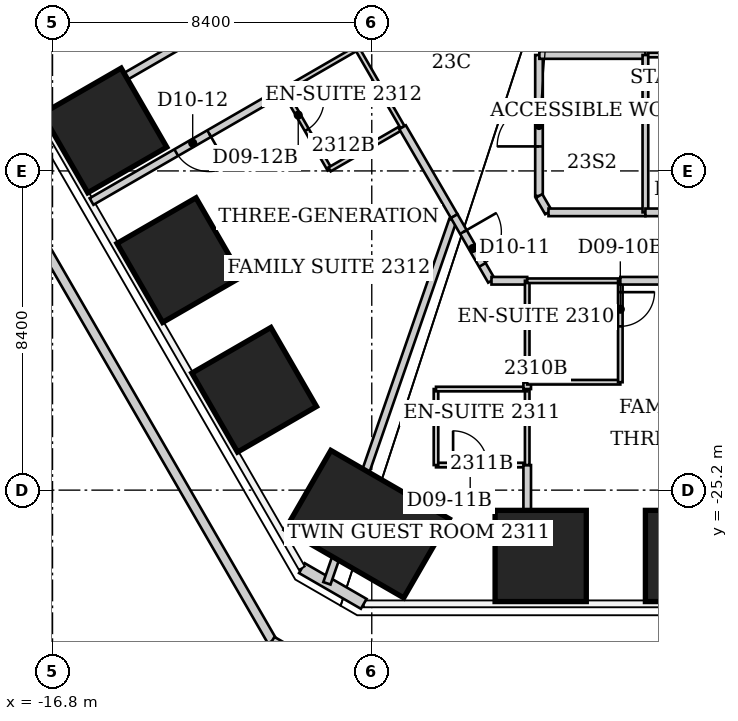
"""IFC4 building model, lengths in metres.
Left out: names, types, materials, properties, quantities, classifications, styles, units other than length and angle.
Written with IfcOpenShell. Run it as: python <this file> out.ifc"""

import sys

from ifc_helpers import new_model, si_unit, direction, frame, frame_2d, origin, origin_2d, place, context, subcontext, project, spatial, rectangle, extrude, clip, halfspace, element, fill, save


model = new_model("IFC4")
c1 = context("Model", 3, precision=1e-05, world=origin(), true_north=direction((0.0, 1.0)))
c2 = subcontext(c1, "Body", "Model", "MODEL_VIEW")
j1 = project(units=[si_unit("LENGTHUNIT", "METRE"), si_unit("PLANEANGLEUNIT", "RADIAN")], contexts=[c1])
p1 = place(None, origin())
s1 = spatial("IfcSite", under=j1, at=p1, CompositionType="ELEMENT")
p2 = place(p1, origin())
s2 = spatial("IfcBuilding", under=s1, at=p2, CompositionType="ELEMENT")
p3 = place(p2, frame((0.0, 0.0, 96.8)))
s3 = spatial("IfcBuildingStorey", under=s2, at=p3, CompositionType="ELEMENT", Elevation=96.8)
p4 = place(p3, frame((0.0, -26.932, -0.055), z_axis=(0.0, 0.0, 1.0), x_axis=(0.0, -1.0, 0.0)))
e1 = element("IfcColumn", 1, at=p4, inside=s3, PredefinedType="COLUMN", context=c2, shape_type="SweptSolid", body=[
    clip(extrude(rectangle(XDim=2.4, YDim=2.4, at=origin_2d()), origin(), (0.0, 0.0, 1.0), 3.855), halfspace(frame((0.0, 0.0, 0.055)), True)),
])
p5 = place(p3, frame((-3.955, -26.932, -0.063), z_axis=(0.0, 0.0, 1.0), x_axis=(0.0, -1.0, 0.0)))
e2 = element("IfcColumn", 2, at=p5, inside=s3, PredefinedType="COLUMN", context=c2, shape_type="SweptSolid", body=[
    clip(extrude(rectangle(XDim=2.4, YDim=2.4, at=origin_2d()), origin(), (0.0, 0.0, 1.0), 3.863), halfspace(frame((0.0, 0.0, 0.063)), True)),
])
p6 = place(p3, frame((-8.518, -26.094, -0.074), z_axis=(0.0, 0.0, 1.0), x_axis=(-0.5, -0.866025403784, 0.0)))
e3 = element("IfcColumn", 3, at=p6, inside=s3, PredefinedType="COLUMN", context=c2, shape_type="SweptSolid", body=[
    clip(extrude(rectangle(XDim=2.4, YDim=3.6, at=origin_2d()), origin(), (0.0, 0.0, 1.0), 3.874), halfspace(frame((0.0, 0.0, 0.074)), True)),
])
p7 = place(p3, frame((-11.494, -22.559, -0.073), z_axis=(0.0, 0.0, 1.0), x_axis=(-0.866025403784, -0.5, 0.0)))
e4 = element("IfcColumn", 4, at=p7, inside=s3, PredefinedType="COLUMN", context=c2, shape_type="SweptSolid", body=[
    clip(extrude(rectangle(XDim=2.4, YDim=2.4, at=origin_2d()), origin(), (0.0, 0.0, 1.0), 3.873), halfspace(frame((0.0, 0.0, 0.073)), True)),
])
p8 = place(p3, frame((-13.464, -19.147, -0.064), z_axis=(0.0, 0.0, 1.0), x_axis=(-0.866025403784, -0.5, 0.0)))
e5 = element("IfcColumn", 5, at=p8, inside=s3, PredefinedType="COLUMN", context=c2, shape_type="SweptSolid", body=[
    clip(extrude(rectangle(XDim=2.4, YDim=2.4, at=origin_2d()), origin(), (0.0, 0.0, 1.0), 3.865), halfspace(frame((0.0, 0.0, 0.064)), True)),
])
p9 = place(p3, frame((-15.434, -15.735, -0.056), z_axis=(0.0, 0.0, 1.0), x_axis=(-0.866025403784, -0.5, 0.0)))
e6 = element("IfcColumn", 6, at=p9, inside=s3, PredefinedType="COLUMN", context=c2, shape_type="SweptSolid", body=[
    clip(extrude(rectangle(XDim=2.4, YDim=2.4, at=origin_2d()), origin(), (0.0, 0.0, 1.0), 3.856), halfspace(frame((0.0, 0.0, 0.056)), True)),
])
p10 = place(p3, frame((-17.404, -12.323, -0.048), z_axis=(0.0, 0.0, 1.0), x_axis=(-0.866025403784, -0.5, 0.0)))
e7 = element("IfcColumn", 7, at=p10, inside=s3, PredefinedType="COLUMN", context=c2, shape_type="SweptSolid", body=[
    clip(extrude(rectangle(XDim=2.4, YDim=2.4, at=origin_2d()), origin(), (0.0, 0.0, 1.0), 3.848), halfspace(frame((0.0, 0.0, 0.048)), True)),
])
p11 = place(p3, frame((-8.611, -28.192, 0.0), z_axis=(0.0, 0.0, 1.0), x_axis=(-0.866045024864, 0.499966013754, 0.0)))
e8 = element("IfcWall", 8, at=p11, inside=s3, PredefinedType="SOLIDWALL", context=c2, shape_type="SweptSolid", body=[
    extrude(rectangle(XDim=1.88, YDim=0.3, at=frame_2d((0.94, 0.0))), origin(), (0.0, 0.0, 1.0), 3.64),
])
p12 = place(p3, frame((-30.775, 5.038, 0.0), z_axis=(0.0, 0.0, 1.0), x_axis=(0.499999235055, -0.866025845425, 0.0)))
e9 = element("IfcWall", 9, at=p12, inside=s3, PredefinedType="PARAPET", context=c2, shape_type="SweptSolid", body=[
    extrude(rectangle(XDim=39.5, YDim=0.25, at=frame_2d((19.75, 0.0))), origin(), (0.0, 0.0, 1.0), 1.1),
])
p13 = place(p3, frame((-11.024, -29.171, 0.0), z_axis=(0.0, 0.0, 1.0), x_axis=(0.865627711351, -0.500688191733, 0.0)))
e10 = element("IfcWall", 10, at=p13, inside=s3, PredefinedType="PARAPET", context=c2, shape_type="SweptSolid", body=[
    extrude(rectangle(XDim=1.991, YDim=0.25, at=frame_2d((0.996, 0.0))), origin(), (0.0, 0.0, 1.0), 1.1),
])
p14 = place(p3, frame((-15.774, -17.605, 0.0), z_axis=(0.0, 0.0, 1.0), x_axis=(0.865924141063, 0.500175351175, 0.0)))
e11 = element("IfcWall", 11, at=p14, inside=s3, PredefinedType="PARTITIONING", context=c2, shape_type="SweptSolid", body=[
    extrude(rectangle(XDim=5.848, YDim=0.2, at=frame_2d((2.924, 0.0))), origin(), (0.0, 0.0, 1.0), 3.64),
])
p15 = place(p14, frame((2.574, 0.0, 0.0)))
e12 = element("IfcOpeningElement", 12, at=p15, cuts=e11, PredefinedType="OPENING", context=c2, shape_type="SweptSolid", body=[
    extrude(rectangle(XDim=1.0, YDim=2.13, at=frame_2d((0.5, 1.065))), frame((0.0, 0.1, 0.0), z_axis=(0.0, -1.0, 0.0), x_axis=(1.0, 0.0, 0.0)), (0.0, 0.0, 1.0), 0.2),
])
p16 = place(p3, frame((-10.71, -14.68, 0.0), z_axis=(0.0, 0.0, 1.0), x_axis=(0.499693115345, -0.866202511239, 0.0)))
e13 = element("IfcWall", 13, at=p16, inside=s3, PredefinedType="PARTITIONING", context=c2, shape_type="SweptSolid", body=[
    extrude(rectangle(XDim=2.401, YDim=0.12, at=frame_2d((1.201, 0.0))), origin(), (0.0, 0.0, 1.0), 3.64),
])
p17 = place(p16, frame((0.3, 0.0, 0.0)))
e14 = element("IfcOpeningElement", 14, at=p17, cuts=e13, PredefinedType="OPENING", context=c2, shape_type="SweptSolid", body=[
    extrude(rectangle(XDim=0.9, YDim=2.03, at=frame_2d((0.45, 1.015))), frame((0.0, 0.06, 0.0), z_axis=(0.0, -1.0, 0.0), x_axis=(1.0, 0.0, 0.0)), (0.0, 0.0, 1.0), 0.12),
])
p18 = place(p3, frame((-10.71, -14.68, 0.0), z_axis=(0.0, 0.0, 1.0), x_axis=(0.86575271903, 0.500472006703, 0.0)))
e15 = element("IfcWall", 15, at=p18, inside=s3, PredefinedType="PARTITIONING", context=c2, shape_type="SweptSolid", body=[
    extrude(rectangle(XDim=2.218, YDim=0.12, at=frame_2d((1.109, 0.0))), origin(), (0.0, 0.0, 1.0), 3.64),
])
p19 = place(p3, frame((-10.003, -11.498, 0.0), z_axis=(0.0, 0.0, 1.0), x_axis=(-0.865882003792, -0.500248293859, 0.0)))
e16 = element("IfcWall", 16, at=p19, inside=s3, PredefinedType="PARTITIONING", context=c2, shape_type="SweptSolid", body=[
    extrude(rectangle(XDim=8.051, YDim=0.2, at=frame_2d((4.025, 0.0))), origin(), (0.0, 0.0, 1.0), 3.64),
])
p20 = place(p3, frame((-9.58, -27.652, 0.0), z_axis=(0.0, 0.0, 1.0), x_axis=(0.327601243296, 0.944816080193, 0.0)))
e17 = element("IfcWall", 17, at=p20, inside=s3, PredefinedType="PARTITIONING", context=c2, shape_type="SweptSolid", body=[
    extrude(rectangle(XDim=10.116, YDim=0.2, at=frame_2d((5.058, 0.0))), origin(), (0.0, 0.0, 1.0), 3.64),
])
p21 = place(p3, frame((-9.51, -16.76, 0.0), z_axis=(0.0, 0.0, 1.0), x_axis=(0.865705017107, 0.500554515868, 0.0)))
e18 = element("IfcWall", 18, at=p21, inside=s3, PredefinedType="PARTITIONING", context=c2, shape_type="SweptSolid", body=[
    extrude(rectangle(XDim=2.218, YDim=0.12, at=frame_2d((1.109, 0.0))), origin(), (0.0, 0.0, 1.0), 3.64),
])
p22 = place(p3, frame((-8.79, -13.57, 0.0), z_axis=(0.0, 0.0, 1.0), x_axis=(0.499737123639, -0.866177122335, 0.0)))
e19 = element("IfcWall", 19, at=p22, inside=s3, PredefinedType="PARTITIONING", context=c2, shape_type="SweptSolid", body=[
    extrude(rectangle(XDim=2.401, YDim=0.12, at=frame_2d((1.201, 0.0))), origin(), (0.0, 0.0, 1.0), 3.64),
])
p23 = place(p3, frame((-7.59, -15.65, 0.0), z_axis=(0.0, 0.0, 1.0), x_axis=(0.502507574725, -0.864572806271, 0.0)))
e20 = element("IfcWall", 20, at=p23, inside=s3, PredefinedType="PARTITIONING", context=c2, shape_type="SweptSolid", body=[
    extrude(rectangle(XDim=2.707, YDim=0.2, at=frame_2d((1.353, 0.0))), origin(), (0.0, 0.0, 1.0), 3.64),
])
p24 = place(p3, frame((-6.71, -24.54, 0.0), z_axis=(0.0, 0.0, 1.0), x_axis=(1.0, 0.0, 0.0)))
e21 = element("IfcWall", 21, at=p24, inside=s3, PredefinedType="PARTITIONING", context=c2, shape_type="SweptSolid", body=[
    extrude(rectangle(XDim=2.4, YDim=0.12, at=frame_2d((1.2, 0.0))), origin(), (0.0, 0.0, 1.0), 3.64),
])
p25 = place(p24, frame((0.45, 0.0, 0.0)))
e22 = element("IfcOpeningElement", 22, at=p25, cuts=e21, PredefinedType="OPENING", context=c2, shape_type="SweptSolid", body=[
    extrude(rectangle(XDim=0.9, YDim=2.03, at=frame_2d((0.45, 1.015))), frame((0.0, 0.06, 0.0), z_axis=(0.0, -1.0, 0.0), x_axis=(1.0, 0.0, 0.0)), (0.0, 0.0, 1.0), 0.12),
])
p26 = place(p3, frame((-6.71, -22.54, 0.0), z_axis=(0.0, 0.0, 1.0), x_axis=(0.0, -1.0, 0.0)))
e23 = element("IfcWall", 23, at=p26, inside=s3, PredefinedType="PARTITIONING", context=c2, shape_type="SweptSolid", body=[
    extrude(rectangle(XDim=2.0, YDim=0.12, at=frame_2d((1.0, 0.0))), origin(), (0.0, 0.0, 1.0), 3.64),
])
p27 = place(p3, frame((-6.23, -17.99, 0.0), z_axis=(0.0, 0.0, 1.0), x_axis=(0.499431599995, -0.866353321068, 0.0)))
e24 = element("IfcWall", 24, at=p27, inside=s3, PredefinedType="PARTITIONING", context=c2, shape_type="SweptSolid", body=[
    extrude(rectangle(XDim=1.962, YDim=0.2, at=frame_2d((0.981, 0.0))), origin(), (0.0, 0.0, 1.0), 3.64),
])
p28 = place(p27, frame((0.481, 0.0, 0.0)))
e25 = element("IfcOpeningElement", 25, at=p28, cuts=e24, PredefinedType="OPENING", context=c2, shape_type="SweptSolid", body=[
    extrude(rectangle(XDim=1.0, YDim=2.13, at=frame_2d((0.5, 1.065))), frame((0.0, 0.1, 0.0), z_axis=(0.0, -1.0, 0.0), x_axis=(1.0, 0.0, 0.0)), (0.0, 0.0, 1.0), 0.2),
])
p29 = place(p3, frame((-5.25, -19.69, 0.0), z_axis=(0.0, 0.0, 1.0), x_axis=(1.0, 0.0, 0.0)))
e26 = element("IfcWall", 26, at=p29, inside=s3, PredefinedType="PARTITIONING", context=c2, shape_type="SweptSolid", body=[
    extrude(rectangle(XDim=0.94, YDim=0.2, at=frame_2d((0.47, 0.0))), origin(), (0.0, 0.0, 1.0), 3.64),
])
p30 = place(p3, frame((-4.31, -28.07, 0.0), z_axis=(0.0, 0.0, 1.0), x_axis=(0.0, 1.0, 0.0)))
e27 = element("IfcWall", 27, at=p30, inside=s3, PredefinedType="PARTITIONING", context=c2, shape_type="SweptSolid", body=[
    extrude(rectangle(XDim=3.53, YDim=0.2, at=frame_2d((1.765, 0.0))), origin(), (0.0, 0.0, 1.0), 3.64),
])
p31 = place(p3, frame((-4.31, -24.54, 0.0), z_axis=(0.0, 0.0, 1.0), x_axis=(0.0, 1.0, 0.0)))
e28 = element("IfcWall", 28, at=p31, inside=s3, PredefinedType="PARTITIONING", context=c2, shape_type="SweptSolid", body=[
    extrude(rectangle(XDim=2.0, YDim=0.12, at=frame_2d((1.0, 0.0))), origin(), (0.0, 0.0, 1.0), 3.64),
])
p32 = place(p3, frame((-4.31, -22.54, 0.0), z_axis=(0.0, 0.0, 1.0), x_axis=(-1.0, 0.0, 0.0)))
e29 = element("IfcWall", 29, at=p32, inside=s3, PredefinedType="PARTITIONING", context=c2, shape_type="SweptSolid", body=[
    extrude(rectangle(XDim=2.4, YDim=0.12, at=frame_2d((1.2, 0.0))), origin(), (0.0, 0.0, 1.0), 3.64),
])
p33 = place(p3, frame((-4.31, -22.54, 0.0), z_axis=(0.0, 0.0, 1.0), x_axis=(0.0, 1.0, 0.0)))
e30 = element("IfcWall", 30, at=p33, inside=s3, PredefinedType="PARTITIONING", context=c2, shape_type="SweptSolid", body=[
    extrude(rectangle(XDim=0.18, YDim=0.2, at=frame_2d((0.09, 0.0))), origin(), (0.0, 0.0, 1.0), 3.64),
])
p34 = place(p3, frame((-4.31, -22.36, 0.0), z_axis=(0.0, 0.0, 1.0), x_axis=(0.0, 1.0, 0.0)))
e31 = element("IfcWall", 31, at=p34, inside=s3, PredefinedType="PARTITIONING", context=c2, shape_type="SweptSolid", body=[
    extrude(rectangle(XDim=2.67, YDim=0.12, at=frame_2d((1.335, 0.0))), origin(), (0.0, 0.0, 1.0), 3.64),
])
for number, where, z_axis, x_axis in (
    (32, (-4.31, -22.36, 0.0), (0.0, 0.0, 1.0), (1.0, 0.0, 0.0)),
    (33, (-4.31, -19.69, 0.0), (0.0, 0.0, 1.0), (1.0, 0.0, 0.0)),
):
    element("IfcWall", number, at=place(p3, frame(where, z_axis=z_axis, x_axis=x_axis)), inside=s3, PredefinedType="PARTITIONING", context=c2, shape_type="SweptSolid", body=[
        extrude(rectangle(XDim=2.45, YDim=0.12, at=frame_2d((1.225, 0.0))), origin(), (0.0, 0.0, 1.0), 3.64),
    ])
p35 = place(p3, frame((-4.0, -17.46, 0.0), z_axis=(0.0, 0.0, 1.0), x_axis=(0.0, 1.0, 0.0)))
e34 = element("IfcWall", 34, at=p35, inside=s3, PredefinedType="PARTITIONING", context=c2, shape_type="SweptSolid", body=[
    extrude(rectangle(XDim=3.71, YDim=0.2, at=frame_2d((1.855, 0.0))), origin(), (0.0, 0.0, 1.0), 2.878),
])
p36 = place(p35, frame((1.305, 0.0, 0.0)))
e35 = element("IfcOpeningElement", 35, at=p36, cuts=e34, PredefinedType="OPENING", context=c2, shape_type="SweptSolid", body=[
    extrude(rectangle(XDim=1.1, YDim=2.2, at=frame_2d((0.55, 1.1))), frame((0.0, 0.1, 0.0), z_axis=(0.0, -1.0, 0.0), x_axis=(1.0, 0.0, 0.0)), (0.0, 0.0, 1.0), 0.2),
])
p37 = place(p3, frame((-3.99, -13.75, 0.0), z_axis=(0.0, 0.0, 1.0), x_axis=(1.0, 0.0, 0.0)))
e36 = element("IfcWall", 36, at=p37, inside=s3, PredefinedType="PARTITIONING", context=c2, shape_type="SweptSolid", body=[
    extrude(rectangle(XDim=2.79, YDim=0.2, at=frame_2d((1.395, 0.0))), origin(), (0.0, 0.0, 1.0), 3.64),
])
p38 = place(p3, frame((-3.75, -17.89, 0.0), z_axis=(0.0, 0.0, 1.0), x_axis=(-0.502680181512, 0.864472460588, 0.0)))
e37 = element("IfcWall", 37, at=p38, inside=s3, PredefinedType="PARTITIONING", context=c2, shape_type="SweptSolid", body=[
    extrude(rectangle(XDim=0.497, YDim=0.2, at=frame_2d((0.249, 0.0))), origin(), (0.0, 0.0, 1.0), 3.64),
])
p39 = place(p3, frame((-1.86, -22.36, 0.0), z_axis=(0.0, 0.0, 1.0), x_axis=(0.0, 1.0, 0.0)))
e38 = element("IfcWall", 38, at=p39, inside=s3, PredefinedType="PARTITIONING", context=c2, shape_type="SweptSolid", body=[
    extrude(rectangle(XDim=2.67, YDim=0.12, at=frame_2d((1.335, 0.0))), origin(), (0.0, 0.0, 1.0), 2.86),
])
p40 = place(p39, frame((1.47, 0.0, 0.0)))
e39 = element("IfcOpeningElement", 39, at=p40, cuts=e38, PredefinedType="OPENING", context=c2, shape_type="SweptSolid", body=[
    extrude(rectangle(XDim=0.9, YDim=2.03, at=frame_2d((0.45, 1.015))), frame((0.0, 0.06, 0.0), z_axis=(0.0, -1.0, 0.0), x_axis=(1.0, 0.0, 0.0)), (0.0, 0.0, 1.0), 0.12),
])
p41 = place(p3, frame((-1.86, -19.69, 0.0), z_axis=(0.0, 0.0, 1.0), x_axis=(1.0, 0.0, 0.0)))
e40 = element("IfcWall", 40, at=p41, inside=s3, PredefinedType="PARTITIONING", context=c2, shape_type="SweptSolid", body=[
    extrude(rectangle(XDim=6.17, YDim=0.2, at=frame_2d((3.085, 0.0))), origin(), (0.0, 0.0, 1.0), 3.64),
])
p42 = place(p41, frame((2.585, 0.0, 0.0)))
e41 = element("IfcOpeningElement", 41, at=p42, cuts=e40, PredefinedType="OPENING", context=c2, shape_type="SweptSolid", body=[
    extrude(rectangle(XDim=1.0, YDim=2.13, at=frame_2d((0.5, 1.065))), frame((0.0, 0.1, 0.0), z_axis=(0.0, -1.0, 0.0), x_axis=(1.0, 0.0, 0.0)), (0.0, 0.0, 1.0), 0.2),
])
p43 = place(p3, frame((-1.2, -17.89, 0.0), z_axis=(0.0, 0.0, 1.0), x_axis=(-1.0, 0.0, 0.0)))
e42 = element("IfcWall", 42, at=p43, inside=s3, PredefinedType="PARTITIONING", context=c2, shape_type="SweptSolid", body=[
    extrude(rectangle(XDim=2.55, YDim=0.2, at=frame_2d((1.275, 0.0))), origin(), (0.0, 0.0, 1.0), 3.64),
])
p44 = place(p3, frame((-1.2, -13.75, 0.0), z_axis=(0.0, 0.0, 1.0), x_axis=(0.0, -1.0, 0.0)))
e43 = element("IfcWall", 43, at=p44, inside=s3, PredefinedType="PARTITIONING", context=c2, shape_type="SweptSolid", body=[
    extrude(rectangle(XDim=4.14, YDim=0.15, at=frame_2d((2.07, 0.0))), origin(), (0.0, 0.0, 1.0), 3.64),
])
p45 = place(p3, frame((-1.125, -13.75, 0.0), z_axis=(0.0, 0.0, 1.0), x_axis=(1.0, 0.0, 0.0)))
e44 = element("IfcWall", 44, at=p45, inside=s3, PredefinedType="PARTITIONING", context=c2, shape_type="SweptSolid", body=[
    extrude(rectangle(XDim=0.955, YDim=0.12, at=frame_2d((0.478, 0.0))), origin(), (0.0, 0.0, 1.0), 3.64),
])
p46 = place(p3, frame((1.6, -17.89, 0.0), z_axis=(0.0, 0.0, 1.0), x_axis=(-1.0, 0.0, 0.0)))
e45 = element("IfcWall", 45, at=p46, inside=s3, PredefinedType="PARTITIONING", context=c2, shape_type="SweptSolid", body=[
    extrude(rectangle(XDim=2.8, YDim=0.2, at=frame_2d((1.4, 0.0))), origin(), (0.0, 0.0, 1.0), 3.64),
])
p47 = place(p46, frame((0.85, 0.0, 0.0)))
e46 = element("IfcOpeningElement", 46, at=p47, cuts=e45, PredefinedType="OPENING", context=c2, shape_type="SweptSolid", body=[
    extrude(rectangle(XDim=1.1, YDim=2.2, at=frame_2d((0.55, 1.1))), frame((0.0, 0.1, 0.0), z_axis=(0.0, -1.0, 0.0), x_axis=(1.0, 0.0, 0.0)), (0.0, 0.0, 1.0), 0.2),
])
p48 = place(p40, origin())
e47 = element("IfcDoor", 47, at=p48, inside=s3, OperationType="SINGLE_SWING_RIGHT", PredefinedType="DOOR", context=c2, shape_type="SweptSolid", body=[
    extrude(rectangle(XDim=0.9, YDim=2.03, at=frame_2d((0.45, 1.015))), frame((0.0, 0.025, 0.0), z_axis=(0.0, -1.0, 0.0), x_axis=(1.0, 0.0, 0.0)), (0.0, 0.0, 1.0), 0.05),
])
fill(e39, e47)
p49 = place(p28, origin())
e48 = element("IfcDoor", 48, at=p49, inside=s3, OperationType="SINGLE_SWING_LEFT", PredefinedType="DOOR", context=c2, shape_type="SweptSolid", body=[
    extrude(rectangle(XDim=1.0, YDim=2.13, at=frame_2d((0.5, 1.065))), frame((0.0, 0.025, 0.0), z_axis=(0.0, -1.0, 0.0), x_axis=(1.0, 0.0, 0.0)), (0.0, 0.0, 1.0), 0.05),
])
fill(e25, e48)
p50 = place(p25, origin())
e49 = element("IfcDoor", 49, at=p50, inside=s3, OperationType="SINGLE_SWING_LEFT", PredefinedType="DOOR", context=c2, shape_type="SweptSolid", body=[
    extrude(rectangle(XDim=0.9, YDim=2.03, at=frame_2d((0.45, 1.015))), frame((0.0, 0.025, 0.0), z_axis=(0.0, -1.0, 0.0), x_axis=(1.0, 0.0, 0.0)), (0.0, 0.0, 1.0), 0.05),
])
fill(e22, e49)
p51 = place(p15, origin())
e50 = element("IfcDoor", 50, at=p51, inside=s3, OperationType="SINGLE_SWING_RIGHT", PredefinedType="DOOR", context=c2, shape_type="SweptSolid", body=[
    extrude(rectangle(XDim=1.0, YDim=2.13, at=frame_2d((0.5, 1.065))), frame((0.0, 0.025, 0.0), z_axis=(0.0, -1.0, 0.0), x_axis=(1.0, 0.0, 0.0)), (0.0, 0.0, 1.0), 0.05),
])
fill(e12, e50)
p52 = place(p17, origin())
e51 = element("IfcDoor", 51, at=p52, inside=s3, OperationType="SINGLE_SWING_LEFT", PredefinedType="DOOR", context=c2, shape_type="SweptSolid", body=[
    extrude(rectangle(XDim=0.9, YDim=2.03, at=frame_2d((0.45, 1.015))), frame((0.0, 0.025, 0.0), z_axis=(0.0, -1.0, 0.0), x_axis=(1.0, 0.0, 0.0)), (0.0, 0.0, 1.0), 0.05),
])
fill(e14, e51)
p53 = place(p36, origin())
e52 = element("IfcDoor", 52, at=p53, inside=s3, OperationType="SINGLE_SWING_LEFT", PredefinedType="DOOR", context=c2, shape_type="SweptSolid", body=[
    extrude(rectangle(XDim=1.1, YDim=2.2, at=frame_2d((0.55, 1.1))), frame((0.0, 0.025, 0.0), z_axis=(0.0, -1.0, 0.0), x_axis=(1.0, 0.0, 0.0)), (0.0, 0.0, 1.0), 0.05),
])
fill(e35, e52)
save(model, sys.argv[1])
